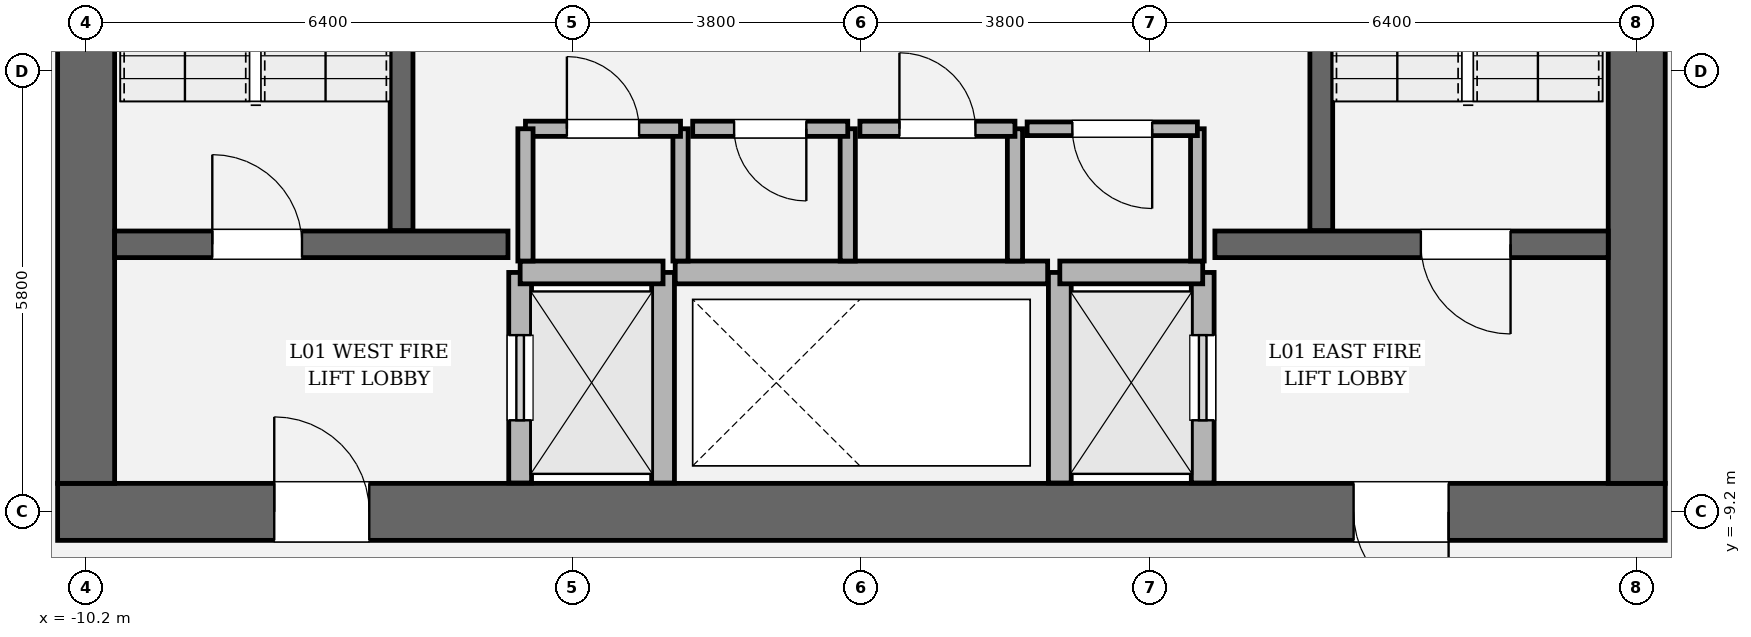
"""IFC4 building model, lengths in metres.
Left out: names, types, materials, properties, quantities, classifications, styles, units other than length and angle.
Written with IfcOpenShell. Run it as: python <this file> out.ifc"""

import sys

from ifc_helpers import new_model, si_unit, direction, frame, frame_2d, origin, place, context, subcontext, project, spatial, rectangle, extrude, element, fill, save


model = new_model("IFC4")
c1 = context("Model", 3, precision=1e-05, world=origin(), true_north=direction((0.0, 1.0)))
c2 = subcontext(c1, "Body", "Model", "MODEL_VIEW")
j1 = project(units=[si_unit("LENGTHUNIT", "METRE"), si_unit("PLANEANGLEUNIT", "RADIAN")], contexts=[c1])
p1 = place(None, origin())
s1 = spatial("IfcSite", under=j1, at=p1, CompositionType="ELEMENT")
p2 = place(p1, origin())
s2 = spatial("IfcBuilding", under=s1, at=p2, CompositionType="ELEMENT")
p3 = place(p2, frame((0.0, 0.0, 6.0)))
s3 = spatial("IfcBuildingStorey", under=s2, at=p3, CompositionType="ELEMENT", Elevation=6.0)
p4 = place(p3, frame((10.575, -9.2, 0.0), z_axis=(0.0, 0.0, 1.0), x_axis=(-1.0, 0.0, 0.0)))
e1 = element("IfcWall", 1, at=p4, inside=s3, PredefinedType="SHEAR", context=c2, shape_type="SweptSolid", body=[
    extrude(rectangle(XDim=21.15, YDim=0.75, at=frame_2d((10.575, 0.0))), origin(), (0.0, 0.0, 1.0), 5.4),
])
p5 = place(p4, frame((2.85, 0.0, 0.0)))
e2 = element("IfcOpeningElement", 2, at=p5, cuts=e1, PredefinedType="OPENING", context=c2, shape_type="SweptSolid", body=[
    extrude(rectangle(XDim=1.25, YDim=2.25, at=frame_2d((0.625, 1.125))), frame((0.0, 0.385, 0.0), z_axis=(0.0, -1.0, 0.0), x_axis=(1.0, 0.0, 0.0)), (0.0, 0.0, 1.0), 0.77),
])
p6 = place(p4, frame((17.05, 0.0, 0.0)))
e3 = element("IfcOpeningElement", 3, at=p6, cuts=e1, PredefinedType="OPENING", context=c2, shape_type="SweptSolid", body=[
    extrude(rectangle(XDim=1.25, YDim=2.25, at=frame_2d((0.625, 1.125))), frame((0.0, 0.385, 0.0), z_axis=(0.0, -1.0, 0.0), x_axis=(1.0, 0.0, 0.0)), (0.0, 0.0, 1.0), 0.77),
])
p7 = place(p3, frame((-10.2, -8.825, 0.0), z_axis=(0.0, 0.0, 1.0), x_axis=(0.0, 1.0, 0.0)))
e4 = element("IfcWall", 4, at=p7, inside=s3, PredefinedType="SHEAR", context=c2, shape_type="SweptSolid", body=[
    extrude(rectangle(XDim=17.65, YDim=0.75, at=frame_2d((8.825, 0.0))), origin(), (0.0, 0.0, 1.0), 5.4),
])
p8 = place(p7, frame((12.615, 0.0, 0.0)))
e5 = element("IfcOpeningElement", 5, at=p8, cuts=e4, PredefinedType="OPENING", context=c2, shape_type="SweptSolid", body=[
    extrude(rectangle(XDim=1.18, YDim=2.2, at=frame_2d((0.59, 1.1))), frame((0.0, 0.385, 0.0), z_axis=(0.0, -1.0, 0.0), x_axis=(1.0, 0.0, 0.0)), (0.0, 0.0, 1.0), 0.77),
])
p9 = place(p3, frame((10.2, 8.825, 0.0), z_axis=(0.0, 0.0, 1.0), x_axis=(0.0, -1.0, 0.0)))
e6 = element("IfcWall", 6, at=p9, inside=s3, PredefinedType="SHEAR", context=c2, shape_type="SweptSolid", body=[
    extrude(rectangle(XDim=17.65, YDim=0.75, at=frame_2d((8.825, 0.0))), origin(), (0.0, 0.0, 1.0), 5.4),
])
p10 = place(p9, frame((3.855, 0.0, 0.0)))
e7 = element("IfcOpeningElement", 7, at=p10, cuts=e6, PredefinedType="OPENING", context=c2, shape_type="SweptSolid", body=[
    extrude(rectangle(XDim=1.18, YDim=2.2, at=frame_2d((0.59, 1.1))), frame((0.0, 0.385, 0.0), z_axis=(0.0, -1.0, 0.0), x_axis=(1.0, 0.0, 0.0)), (0.0, 0.0, 1.0), 0.77),
])
for number, where, z_axis, x_axis in (
    (8, (-6.05, -5.5, 0.0), (0.0, 0.0, 1.0), (0.0, 1.0, 0.0)),
    (9, (6.05, 3.45, 0.0), (0.0, 0.0, 1.0), (0.0, -1.0, 0.0)),
):
    element("IfcWall", number, at=place(p3, frame(where, z_axis=z_axis, x_axis=x_axis)), inside=s3, PredefinedType="SOLIDWALL", context=c2, shape_type="SweptSolid", body=[
        extrude(rectangle(XDim=8.95, YDim=0.3, at=frame_2d((4.475, 0.0))), origin(), (0.0, 0.0, 1.0), 5.4),
    ])
p11 = place(p3, frame((-9.825, -5.68, 0.0), z_axis=(0.0, 0.0, 1.0), x_axis=(1.0, 0.0, 0.0)))
e10 = element("IfcWall", 10, at=p11, inside=s3, PredefinedType="SOLIDWALL", context=c2, shape_type="SweptSolid", body=[
    extrude(rectangle(XDim=5.175, YDim=0.35, at=frame_2d((2.587, 0.0))), origin(), (0.0, 0.0, 1.0), 5.4),
])
p12 = place(p11, frame((1.285, 0.0, 0.0)))
e11 = element("IfcOpeningElement", 11, at=p12, cuts=e10, PredefinedType="OPENING", context=c2, shape_type="SweptSolid", body=[
    extrude(rectangle(XDim=1.18, YDim=2.2, at=frame_2d((0.59, 1.1))), frame((0.0, 0.185, 0.0), z_axis=(0.0, -1.0, 0.0), x_axis=(1.0, 0.0, 0.0)), (0.0, 0.0, 1.0), 0.37),
])
p13 = place(p3, frame((4.65, -5.68, 0.0), z_axis=(0.0, 0.0, 1.0), x_axis=(1.0, 0.0, 0.0)))
e12 = element("IfcWall", 12, at=p13, inside=s3, PredefinedType="SOLIDWALL", context=c2, shape_type="SweptSolid", body=[
    extrude(rectangle(XDim=5.175, YDim=0.35, at=frame_2d((2.587, 0.0))), origin(), (0.0, 0.0, 1.0), 5.4),
])
p14 = place(p13, frame((2.71, 0.0, 0.0)))
e13 = element("IfcOpeningElement", 13, at=p14, cuts=e12, PredefinedType="OPENING", context=c2, shape_type="SweptSolid", body=[
    extrude(rectangle(XDim=1.18, YDim=2.2, at=frame_2d((0.59, 1.1))), frame((0.0, 0.185, 0.0), z_axis=(0.0, -1.0, 0.0), x_axis=(1.0, 0.0, 0.0)), (0.0, 0.0, 1.0), 0.37),
])
p15 = place(p3, frame((-4.49, -8.82, 0.0), z_axis=(0.0, 0.0, 1.0), x_axis=(0.0, 1.0, 0.0)))
e14 = element("IfcWall", 14, at=p15, inside=s3, PredefinedType="SOLIDWALL", context=c2, shape_type="SweptSolid", body=[
    extrude(rectangle(XDim=2.77, YDim=0.3, at=frame_2d((1.385, 0.0))), origin(), (0.0, 0.0, 1.0), 5.12),
])
p16 = place(p15, frame((0.825, 0.0, 0.0)))
e15 = element("IfcOpeningElement", 15, at=p16, cuts=e14, PredefinedType="OPENING", context=c2, shape_type="SweptSolid", body=[
    extrude(rectangle(XDim=1.12, YDim=2.25, at=frame_2d((0.56, 1.125))), frame((0.0, 0.16, 0.0), z_axis=(0.0, -1.0, 0.0), x_axis=(1.0, 0.0, 0.0)), (0.0, 0.0, 1.0), 0.32),
])
p17 = place(p3, frame((-2.61, -8.82, 0.0), z_axis=(0.0, 0.0, 1.0), x_axis=(0.0, 1.0, 0.0)))
e16 = element("IfcWall", 16, at=p17, inside=s3, PredefinedType="SOLIDWALL", context=c2, shape_type="SweptSolid", body=[
    extrude(rectangle(XDim=2.77, YDim=0.3, at=frame_2d((1.385, 0.0))), origin(), (0.0, 0.0, 1.0), 5.12),
])
p18 = place(p3, frame((-4.49, -6.05, 0.0), z_axis=(0.0, 0.0, 1.0), x_axis=(1.0, 0.0, 0.0)))
e17 = element("IfcWall", 17, at=p18, inside=s3, PredefinedType="SOLIDWALL", context=c2, shape_type="SweptSolid", body=[
    extrude(rectangle(XDim=1.88, YDim=0.3, at=frame_2d((0.94, 0.0))), origin(), (0.0, 0.0, 1.0), 5.12),
])
p19 = place(p3, frame((4.49, -8.82, 0.0), z_axis=(0.0, 0.0, 1.0), x_axis=(0.0, 1.0, 0.0)))
e18 = element("IfcWall", 18, at=p19, inside=s3, PredefinedType="SOLIDWALL", context=c2, shape_type="SweptSolid", body=[
    extrude(rectangle(XDim=2.77, YDim=0.3, at=frame_2d((1.385, 0.0))), origin(), (0.0, 0.0, 1.0), 5.12),
])
p20 = place(p19, frame((0.825, 0.0, 0.0)))
e19 = element("IfcOpeningElement", 19, at=p20, cuts=e18, PredefinedType="OPENING", context=c2, shape_type="SweptSolid", body=[
    extrude(rectangle(XDim=1.12, YDim=2.25, at=frame_2d((0.56, 1.125))), frame((0.0, 0.16, 0.0), z_axis=(0.0, -1.0, 0.0), x_axis=(1.0, 0.0, 0.0)), (0.0, 0.0, 1.0), 0.32),
])
p21 = place(p3, frame((2.61, -8.82, 0.0), z_axis=(0.0, 0.0, 1.0), x_axis=(0.0, 1.0, 0.0)))
e20 = element("IfcWall", 20, at=p21, inside=s3, PredefinedType="SOLIDWALL", context=c2, shape_type="SweptSolid", body=[
    extrude(rectangle(XDim=2.77, YDim=0.3, at=frame_2d((1.385, 0.0))), origin(), (0.0, 0.0, 1.0), 5.12),
])
p22 = place(p3, frame((2.61, -6.05, 0.0), z_axis=(0.0, 0.0, 1.0), x_axis=(1.0, 0.0, 0.0)))
e21 = element("IfcWall", 21, at=p22, inside=s3, PredefinedType="SOLIDWALL", context=c2, shape_type="SweptSolid", body=[
    extrude(rectangle(XDim=1.88, YDim=0.3, at=frame_2d((0.94, 0.0))), origin(), (0.0, 0.0, 1.0), 5.12),
])
p23 = place(p3, frame((-2.45, -6.05, 0.0), z_axis=(0.0, 0.0, 1.0), x_axis=(1.0, 0.0, 0.0)))
e22 = element("IfcWall", 22, at=p23, inside=s3, PredefinedType="SOLIDWALL", context=c2, shape_type="SweptSolid", body=[
    extrude(rectangle(XDim=4.9, YDim=0.3, at=frame_2d((2.45, 0.0))), origin(), (0.0, 0.0, 1.0), 5.12),
])
p24 = place(p3, frame((-2.38, -5.9, 0.0), z_axis=(0.0, 0.0, 1.0), x_axis=(0.0, 1.0, 0.0)))
e23 = element("IfcWall", 23, at=p24, inside=s3, PredefinedType="SOLIDWALL", context=c2, shape_type="SweptSolid", body=[
    extrude(rectangle(XDim=1.74, YDim=0.2, at=frame_2d((0.87, 0.0))), origin(), (0.0, 0.0, 1.0), 5.12),
])
p25 = place(p3, frame((-2.38, -4.16, 0.0), z_axis=(0.0, 0.0, 1.0), x_axis=(-1.0, 0.0, 0.0)))
e24 = element("IfcWall", 24, at=p25, inside=s3, PredefinedType="SOLIDWALL", context=c2, shape_type="SweptSolid", body=[
    extrude(rectangle(XDim=2.04, YDim=0.2, at=frame_2d((1.02, 0.0))), origin(), (0.0, 0.0, 1.0), 5.12),
])
p26 = place(p25, frame((0.545, 0.0, 0.0)))
e25 = element("IfcOpeningElement", 25, at=p26, cuts=e24, PredefinedType="OPENING", context=c2, shape_type="SweptSolid", body=[
    extrude(rectangle(XDim=0.95, YDim=2.15, at=frame_2d((0.475, 1.075))), frame((0.0, 0.11, 0.0), z_axis=(0.0, -1.0, 0.0), x_axis=(1.0, 0.0, 0.0)), (0.0, 0.0, 1.0), 0.22),
])
for number, where, z_axis, x_axis in (
    (26, (-4.42, -4.16, 0.0), (0.0, 0.0, 1.0), (0.0, -1.0, 0.0)),
    (27, (-0.18, -5.9, 0.0), (0.0, 0.0, 1.0), (0.0, 1.0, 0.0)),
):
    element("IfcWall", number, at=place(p3, frame(where, z_axis=z_axis, x_axis=x_axis)), inside=s3, PredefinedType="SOLIDWALL", context=c2, shape_type="SweptSolid", body=[
        extrude(rectangle(XDim=1.74, YDim=0.2, at=frame_2d((0.87, 0.0))), origin(), (0.0, 0.0, 1.0), 5.12),
    ])
p27 = place(p3, frame((-0.18, -4.16, 0.0), z_axis=(0.0, 0.0, 1.0), x_axis=(-1.0, 0.0, 0.0)))
e28 = element("IfcWall", 28, at=p27, inside=s3, PredefinedType="SOLIDWALL", context=c2, shape_type="SweptSolid", body=[
    extrude(rectangle(XDim=2.04, YDim=0.2, at=frame_2d((1.02, 0.0))), origin(), (0.0, 0.0, 1.0), 5.12),
])
p28 = place(p27, frame((0.545, 0.0, 0.0)))
e29 = element("IfcOpeningElement", 29, at=p28, cuts=e28, PredefinedType="OPENING", context=c2, shape_type="SweptSolid", body=[
    extrude(rectangle(XDim=0.95, YDim=2.15, at=frame_2d((0.475, 1.075))), frame((0.0, 0.11, 0.0), z_axis=(0.0, -1.0, 0.0), x_axis=(1.0, 0.0, 0.0)), (0.0, 0.0, 1.0), 0.22),
])
p29 = place(p3, frame((2.02, -5.9, 0.0), z_axis=(0.0, 0.0, 1.0), x_axis=(0.0, 1.0, 0.0)))
e30 = element("IfcWall", 30, at=p29, inside=s3, PredefinedType="SOLIDWALL", context=c2, shape_type="SweptSolid", body=[
    extrude(rectangle(XDim=1.74, YDim=0.2, at=frame_2d((0.87, 0.0))), origin(), (0.0, 0.0, 1.0), 5.12),
])
p30 = place(p3, frame((2.02, -4.16, 0.0), z_axis=(0.0, 0.0, 1.0), x_axis=(-1.0, 0.0, 0.0)))
e31 = element("IfcWall", 31, at=p30, inside=s3, PredefinedType="SOLIDWALL", context=c2, shape_type="SweptSolid", body=[
    extrude(rectangle(XDim=2.04, YDim=0.2, at=frame_2d((1.02, 0.0))), origin(), (0.0, 0.0, 1.0), 5.12),
])
p31 = place(p30, frame((0.52, 0.0, 0.0)))
e32 = element("IfcOpeningElement", 32, at=p31, cuts=e31, PredefinedType="OPENING", context=c2, shape_type="SweptSolid", body=[
    extrude(rectangle(XDim=1.0, YDim=2.15, at=frame_2d((0.5, 1.075))), frame((0.0, 0.11, 0.0), z_axis=(0.0, -1.0, 0.0), x_axis=(1.0, 0.0, 0.0)), (0.0, 0.0, 1.0), 0.22),
])
p32 = place(p3, frame((4.42, -5.9, 0.0), z_axis=(0.0, 0.0, 1.0), x_axis=(0.0, 1.0, 0.0)))
e33 = element("IfcWall", 33, at=p32, inside=s3, PredefinedType="PARTITIONING", context=c2, shape_type="SweptSolid", body=[
    extrude(rectangle(XDim=1.74, YDim=0.18, at=frame_2d((0.87, 0.0))), origin(), (0.0, 0.0, 1.0), 5.12),
])
p33 = place(p3, frame((4.42, -4.16, 0.0), z_axis=(0.0, 0.0, 1.0), x_axis=(-1.0, 0.0, 0.0)))
e34 = element("IfcWall", 34, at=p33, inside=s3, PredefinedType="PARTITIONING", context=c2, shape_type="SweptSolid", body=[
    extrude(rectangle(XDim=2.24, YDim=0.18, at=frame_2d((1.12, 0.0))), origin(), (0.0, 0.0, 1.0), 5.12),
])
p34 = place(p33, frame((0.595, 0.0, 0.0)))
e35 = element("IfcOpeningElement", 35, at=p34, cuts=e34, PredefinedType="OPENING", context=c2, shape_type="SweptSolid", body=[
    extrude(rectangle(XDim=1.05, YDim=2.2, at=frame_2d((0.525, 1.1))), frame((0.0, 0.1, 0.0), z_axis=(0.0, -1.0, 0.0), x_axis=(1.0, 0.0, 0.0)), (0.0, 0.0, 1.0), 0.2),
])
p35 = place(p12, origin())
e36 = element("IfcDoor", 36, at=p35, inside=s3, OperationType="SINGLE_SWING_LEFT", PredefinedType="DOOR", context=c2, shape_type="SweptSolid", body=[
    extrude(rectangle(XDim=1.18, YDim=2.2, at=frame_2d((0.59, 1.1))), frame((0.0, 0.025, 0.0), z_axis=(0.0, -1.0, 0.0), x_axis=(1.0, 0.0, 0.0)), (0.0, 0.0, 1.0), 0.05),
])
fill(e11, e36)
p36 = place(p14, origin())
e37 = element("IfcDoor", 37, at=p36, inside=s3, OperationType="SINGLE_SWING_RIGHT", PredefinedType="DOOR", context=c2, shape_type="SweptSolid", body=[
    extrude(rectangle(XDim=1.18, YDim=2.2, at=frame_2d((0.59, 1.1))), frame((0.0, 0.025, 0.0), z_axis=(0.0, -1.0, 0.0), x_axis=(1.0, 0.0, 0.0)), (0.0, 0.0, 1.0), 0.05),
])
fill(e13, e37)
p37 = place(p5, origin())
e38 = element("IfcDoor", 38, at=p37, inside=s3, OperationType="SINGLE_SWING_LEFT", PredefinedType="DOOR", context=c2, shape_type="SweptSolid", body=[
    extrude(rectangle(XDim=1.25, YDim=2.25, at=frame_2d((0.625, 1.125))), frame((0.0, 0.025, 0.0), z_axis=(0.0, -1.0, 0.0), x_axis=(1.0, 0.0, 0.0)), (0.0, 0.0, 1.0), 0.05),
])
fill(e2, e38)
p38 = place(p6, origin())
e39 = element("IfcDoor", 39, at=p38, inside=s3, OperationType="SINGLE_SWING_RIGHT", PredefinedType="DOOR", context=c2, shape_type="SweptSolid", body=[
    extrude(rectangle(XDim=1.25, YDim=2.25, at=frame_2d((0.625, 1.125))), frame((0.0, 0.025, 0.0), z_axis=(0.0, -1.0, 0.0), x_axis=(1.0, 0.0, 0.0)), (0.0, 0.0, 1.0), 0.05),
])
fill(e3, e39)
p39 = place(p16, origin())
e40 = element("IfcDoor", 40, at=p39, inside=s3, OperationType="SLIDING_TO_LEFT", PredefinedType="DOOR", context=c2, shape_type="SweptSolid", body=[
    extrude(rectangle(XDim=1.12, YDim=2.25, at=frame_2d((0.56, 1.125))), frame((0.0, 0.025, 0.0), z_axis=(0.0, -1.0, 0.0), x_axis=(1.0, 0.0, 0.0)), (0.0, 0.0, 1.0), 0.05),
])
fill(e15, e40)
p40 = place(p20, origin())
e41 = element("IfcDoor", 41, at=p40, inside=s3, OperationType="SLIDING_TO_RIGHT", PredefinedType="DOOR", context=c2, shape_type="SweptSolid", body=[
    extrude(rectangle(XDim=1.12, YDim=2.25, at=frame_2d((0.56, 1.125))), frame((0.0, 0.025, 0.0), z_axis=(0.0, -1.0, 0.0), x_axis=(1.0, 0.0, 0.0)), (0.0, 0.0, 1.0), 0.05),
])
fill(e19, e41)
p41 = place(p26, origin())
e42 = element("IfcDoor", 42, at=p41, inside=s3, OperationType="SINGLE_SWING_RIGHT", PredefinedType="DOOR", context=c2, shape_type="SweptSolid", body=[
    extrude(rectangle(XDim=0.95, YDim=2.15, at=frame_2d((0.475, 1.075))), frame((0.0, 0.025, 0.0), z_axis=(0.0, -1.0, 0.0), x_axis=(1.0, 0.0, 0.0)), (0.0, 0.0, 1.0), 0.05),
])
fill(e25, e42)
p42 = place(p28, origin())
e43 = element("IfcDoor", 43, at=p42, inside=s3, OperationType="SINGLE_SWING_LEFT", PredefinedType="DOOR", context=c2, shape_type="SweptSolid", body=[
    extrude(rectangle(XDim=0.95, YDim=2.15, at=frame_2d((0.475, 1.075))), frame((0.0, 0.025, 0.0), z_axis=(0.0, -1.0, 0.0), x_axis=(1.0, 0.0, 0.0)), (0.0, 0.0, 1.0), 0.05),
])
fill(e29, e43)
p43 = place(p31, origin())
e44 = element("IfcDoor", 44, at=p43, inside=s3, OperationType="SINGLE_SWING_RIGHT", PredefinedType="DOOR", context=c2, shape_type="SweptSolid", body=[
    extrude(rectangle(XDim=1.0, YDim=2.15, at=frame_2d((0.5, 1.075))), frame((0.0, 0.025, 0.0), z_axis=(0.0, -1.0, 0.0), x_axis=(1.0, 0.0, 0.0)), (0.0, 0.0, 1.0), 0.05),
])
fill(e32, e44)
p44 = place(p34, origin())
e45 = element("IfcDoor", 45, at=p44, inside=s3, OperationType="SINGLE_SWING_LEFT", PredefinedType="DOOR", context=c2, shape_type="SweptSolid", body=[
    extrude(rectangle(XDim=1.05, YDim=2.2, at=frame_2d((0.525, 1.1))), frame((0.0, 0.025, 0.0), z_axis=(0.0, -1.0, 0.0), x_axis=(1.0, 0.0, 0.0)), (0.0, 0.0, 1.0), 0.05),
])
fill(e35, e45)
save(model, sys.argv[1])
